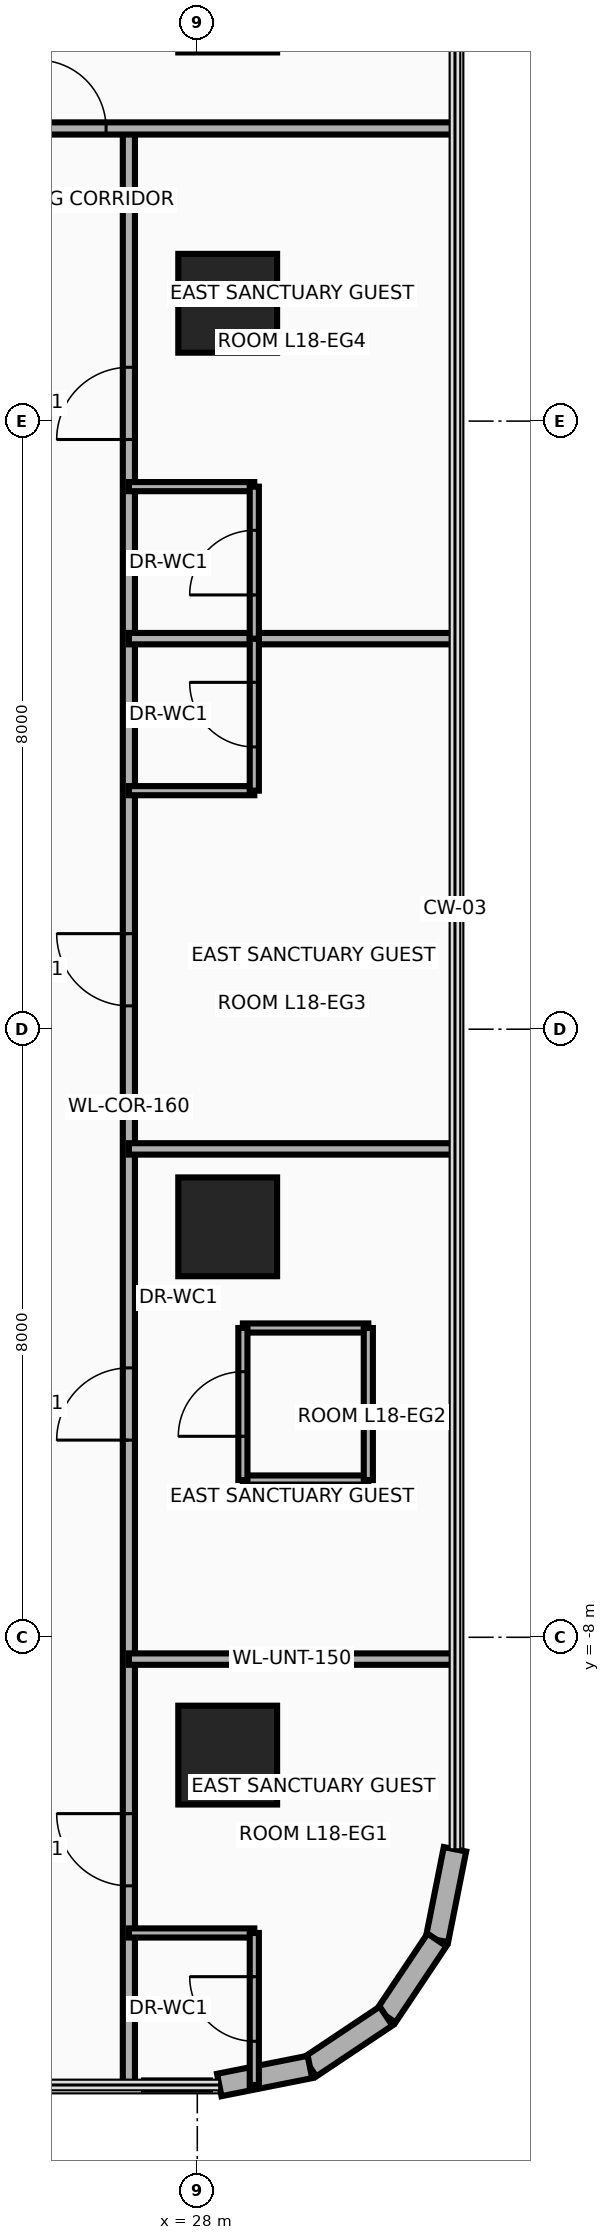
"""IFC4 building model, lengths in metres.
Left out: names, types, materials, properties, quantities, classifications, styles, units other than length and angle.
Written with IfcOpenShell. Run it as: python <this file> out.ifc"""

import sys

from ifc_helpers import new_model, si_unit, direction, frame, frame_2d, origin, origin_2d, place, context, subcontext, project, spatial, rectangle, circle, extrude, source, transform, mapped, element, fill, save


model = new_model("IFC4")
c1 = context("Model", 3, precision=1e-05, world=origin(), true_north=direction((0.0, 1.0)))
c2 = subcontext(c1, "Body", "Model", "MODEL_VIEW")
j1 = project(units=[si_unit("LENGTHUNIT", "METRE"), si_unit("PLANEANGLEUNIT", "RADIAN")], contexts=[c1])
p1 = place(None, origin())
s1 = spatial("IfcSite", under=j1, at=p1, CompositionType="ELEMENT")
p2 = place(p1, origin())
s2 = spatial("IfcBuilding", under=s1, at=p2, CompositionType="ELEMENT")
p3 = place(p2, frame((0.0, 0.0, 74.1)))
s3 = spatial("IfcBuildingStorey", under=s2, at=p3, CompositionType="ELEMENT", Elevation=74.1)
m1 = source(origin(), c2, "Body", "SweptSolid", [
    extrude(circle(Radius=0.65, at=origin_2d()), origin(), (0.0, 0.0, 1.0), 3.7),
])
for number, where, z_axis, x_axis in (
    (1, (28.4, -9.55, 0.0), (0.0, 0.0, 1.0), (1.0, 0.0, 0.0)),
    (2, (28.4, -2.6, 0.0), (0.0, 0.0, 1.0), (1.0, 0.0, 0.0)),
    (3, (28.4, 9.55, 0.0), (0.0, 0.0, 1.0), (1.0, 0.0, 0.0)),
):
    element("IfcColumn", number, at=place(p3, frame(where, z_axis=z_axis, x_axis=x_axis)), inside=s3, PredefinedType="COLUMN", context=c2, shape_type="MappedRepresentation", body=[
        mapped(m1, transform((0.0, 0.0, 0.0), x_axis=(1.0, 0.0, 0.0), y_axis=(0.0, 1.0, 0.0), z_axis=(0.0, 0.0, 1.0), scale=1.0)),
    ])
p4 = place(p3, frame((31.39, -10.789, 0.0), z_axis=(0.0, 0.0, 1.0), x_axis=(-0.194996050505, -0.980804027463, 0.0)))
e4 = element("IfcWall", 4, at=p4, inside=s3, PredefinedType="SOLIDWALL", context=c2, shape_type="SweptSolid", body=[
    extrude(rectangle(XDim=1.216, YDim=0.3, at=frame_2d((0.608, 0.0))), origin(), (0.0, 0.0, 1.0), 3.46),
])
for number, where, z_axis, x_axis in (
    (5, (31.153, -11.982, 0.0), (0.0, 0.0, 1.0), (-0.556, -0.831, 0.0)),
    (6, (30.483, -12.983, 0.0), (0.0, 0.0, 1.0), (-0.831, -0.556, 0.0)),
):
    element("IfcWall", number, at=place(p3, frame(where, z_axis=z_axis, x_axis=x_axis)), inside=s3, PredefinedType="SOLIDWALL", context=c2, shape_type="SweptSolid", body=[
        extrude(rectangle(XDim=1.205, YDim=0.3, at=frame_2d((0.603, 0.0))), origin(), (0.0, 0.0, 1.0), 3.46),
    ])
p5 = place(p3, frame((29.482, -13.653, 0.0), z_axis=(0.0, 0.0, 1.0), x_axis=(-0.980804027463, -0.194996050505, 0.0)))
e7 = element("IfcWall", 7, at=p5, inside=s3, PredefinedType="SOLIDWALL", context=c2, shape_type="SweptSolid", body=[
    extrude(rectangle(XDim=1.216, YDim=0.3, at=frame_2d((0.608, 0.0))), origin(), (0.0, 0.0, 1.0), 3.46),
])
p6 = place(p3, frame((27.1, -13.89, 0.0), z_axis=(0.0, 0.0, 1.0), x_axis=(0.0, 1.0, 0.0)))
e8 = element("IfcWall", 8, at=p6, inside=s3, PredefinedType="PARTITIONING", context=c2, shape_type="SweptSolid", body=[
    extrude(rectangle(XDim=25.74, YDim=0.16, at=frame_2d((12.87, 0.0))), origin(), (0.0, 0.0, 1.0), 2.583),
])
p7 = place(p6, frame((2.62, 0.0, 0.0)))
e9 = element("IfcOpeningElement", 9, at=p7, cuts=e8, PredefinedType="OPENING", context=c2, shape_type="SweptSolid", body=[
    extrude(rectangle(XDim=0.95, YDim=2.15, at=frame_2d((0.475, 1.075))), frame((0.0, 0.095, 0.0), z_axis=(0.0, -1.0, 0.0), x_axis=(1.0, 0.0, 0.0)), (0.0, 0.0, 1.0), 0.19),
])
p8 = place(p6, frame((8.484, 0.0, 0.0)))
e10 = element("IfcOpeningElement", 10, at=p8, cuts=e8, PredefinedType="OPENING", context=c2, shape_type="SweptSolid", body=[
    extrude(rectangle(XDim=0.95, YDim=2.15, at=frame_2d((0.475, 1.075))), frame((0.0, 0.095, 0.0), z_axis=(0.0, -1.0, 0.0), x_axis=(1.0, 0.0, 0.0)), (0.0, 0.0, 1.0), 0.19),
])
p9 = place(p6, frame((14.197, 0.0, 0.0)))
e11 = element("IfcOpeningElement", 11, at=p9, cuts=e8, PredefinedType="OPENING", context=c2, shape_type="SweptSolid", body=[
    extrude(rectangle(XDim=0.95, YDim=2.15, at=frame_2d((0.475, 1.075))), frame((0.0, 0.095, 0.0), z_axis=(0.0, -1.0, 0.0), x_axis=(1.0, 0.0, 0.0)), (0.0, 0.0, 1.0), 0.19),
])
p10 = place(p6, frame((21.648, 0.0, 0.0)))
e12 = element("IfcOpeningElement", 12, at=p10, cuts=e8, PredefinedType="OPENING", context=c2, shape_type="SweptSolid", body=[
    extrude(rectangle(XDim=0.95, YDim=2.15, at=frame_2d((0.475, 1.075))), frame((0.0, 0.095, 0.0), z_axis=(0.0, -1.0, 0.0), x_axis=(1.0, 0.0, 0.0)), (0.0, 0.0, 1.0), 0.19),
])
p11 = place(p3, frame((25.6, 11.85, 0.0), z_axis=(0.0, 0.0, 1.0), x_axis=(1.0, 0.0, 0.0)))
e13 = element("IfcWall", 13, at=p11, inside=s3, PredefinedType="PARTITIONING", context=c2, shape_type="SweptSolid", body=[
    extrude(rectangle(XDim=5.79, YDim=0.16, at=frame_2d((2.895, 0.0))), origin(), (0.0, 0.0, 1.0), 2.896),
])
p12 = place(p11, frame((0.3, 0.0, 0.0)))
e14 = element("IfcOpeningElement", 14, at=p12, cuts=e13, PredefinedType="OPENING", context=c2, shape_type="SweptSolid", body=[
    extrude(rectangle(XDim=0.9, YDim=2.1, at=frame_2d((0.45, 1.05))), frame((0.0, 0.095, 0.0), z_axis=(0.0, -1.0, 0.0), x_axis=(1.0, 0.0, 0.0)), (0.0, 0.0, 1.0), 0.19),
])
for number, where, z_axis, x_axis in (
    (15, (27.1, -8.287, 0.0), (0.0, 0.0, 1.0), (1.0, 0.0, 0.0)),
    (16, (27.1, -1.575, 0.0), (0.0, 0.0, 1.0), (1.0, 0.0, 0.0)),
    (17, (27.1, 5.138, 0.0), (0.0, 0.0, 1.0), (1.0, 0.0, 0.0)),
):
    element("IfcWall", number, at=place(p3, frame(where, z_axis=z_axis, x_axis=x_axis)), inside=s3, PredefinedType="PARTITIONING", context=c2, shape_type="SweptSolid", body=[
        extrude(rectangle(XDim=4.29, YDim=0.15, at=frame_2d((2.145, 0.0))), origin(), (0.0, 0.0, 1.0), 2.896),
    ])
p13 = place(p3, frame((27.1, -11.89, 0.0), z_axis=(0.0, 0.0, 1.0), x_axis=(1.0, 0.0, 0.0)))
e18 = element("IfcWall", 18, at=p13, inside=s3, PredefinedType="PARTITIONING", context=c2, shape_type="SweptSolid", body=[
    extrude(rectangle(XDim=1.65, YDim=0.12, at=frame_2d((0.825, 0.0))), origin(), (0.0, 0.0, 1.0), 3.46),
])
p14 = place(p3, frame((28.75, -13.89, 0.0), z_axis=(0.0, 0.0, 1.0), x_axis=(0.0, 1.0, 0.0)))
e19 = element("IfcWall", 19, at=p14, inside=s3, PredefinedType="PARTITIONING", context=c2, shape_type="SweptSolid", body=[
    extrude(rectangle(XDim=2.0, YDim=0.12, at=frame_2d((1.0, 0.0))), origin(), (0.0, 0.0, 1.0), 3.46),
])
p15 = place(p14, frame((0.575, 0.0, 0.0)))
e20 = element("IfcOpeningElement", 20, at=p15, cuts=e19, PredefinedType="OPENING", context=c2, shape_type="SweptSolid", body=[
    extrude(rectangle(XDim=0.85, YDim=2.1, at=frame_2d((0.425, 1.05))), frame((0.0, 0.075, 0.0), z_axis=(0.0, -1.0, 0.0), x_axis=(1.0, 0.0, 0.0)), (0.0, 0.0, 1.0), 0.15),
])
p16 = place(p3, frame((27.3, -13.89, 0.0), z_axis=(0.0, 0.0, 1.0), x_axis=(1.0, 0.0, 0.0)))
e21 = element("IfcWall", 21, at=p16, inside=s3, PredefinedType="PARTITIONING", context=c2, shape_type="SweptSolid", body=[
    extrude(rectangle(XDim=0.867, YDim=0.12, at=frame_2d((0.433, 0.0))), origin(), (0.0, 0.0, 1.0), 3.46),
])
for number, where, z_axis, x_axis in (
    (22, (28.6, -5.931, 0.0), (0.0, 0.0, 1.0), (1.0, 0.0, 0.0)),
    (23, (28.6, -3.931, 0.0), (0.0, 0.0, 1.0), (1.0, 0.0, 0.0)),
):
    element("IfcWall", number, at=place(p3, frame(where, z_axis=z_axis, x_axis=x_axis)), inside=s3, PredefinedType="PARTITIONING", context=c2, shape_type="SweptSolid", body=[
        extrude(rectangle(XDim=1.65, YDim=0.12, at=frame_2d((0.825, 0.0))), origin(), (0.0, 0.0, 1.0), 3.46),
    ])
p17 = place(p3, frame((30.25, -5.931, 0.0), z_axis=(0.0, 0.0, 1.0), x_axis=(0.0, 1.0, 0.0)))
e24 = element("IfcWall", 24, at=p17, inside=s3, PredefinedType="PARTITIONING", context=c2, shape_type="SweptSolid", body=[
    extrude(rectangle(XDim=2.0, YDim=0.12, at=frame_2d((1.0, 0.0))), origin(), (0.0, 0.0, 1.0), 3.46),
])
p18 = place(p3, frame((28.6, -5.931, 0.0), z_axis=(0.0, 0.0, 1.0), x_axis=(0.0, 1.0, 0.0)))
e25 = element("IfcWall", 25, at=p18, inside=s3, PredefinedType="PARTITIONING", context=c2, shape_type="SweptSolid", body=[
    extrude(rectangle(XDim=2.0, YDim=0.12, at=frame_2d((1.0, 0.0))), origin(), (0.0, 0.0, 1.0), 3.46),
])
p19 = place(p18, frame((0.575, 0.0, 0.0)))
e26 = element("IfcOpeningElement", 26, at=p19, cuts=e25, PredefinedType="OPENING", context=c2, shape_type="SweptSolid", body=[
    extrude(rectangle(XDim=0.85, YDim=2.1, at=frame_2d((0.425, 1.05))), frame((0.0, 0.075, 0.0), z_axis=(0.0, -1.0, 0.0), x_axis=(1.0, 0.0, 0.0)), (0.0, 0.0, 1.0), 0.15),
])
p20 = place(p3, frame((27.1, 3.138, 0.0), z_axis=(0.0, 0.0, 1.0), x_axis=(1.0, 0.0, 0.0)))
e27 = element("IfcWall", 27, at=p20, inside=s3, PredefinedType="PARTITIONING", context=c2, shape_type="SweptSolid", body=[
    extrude(rectangle(XDim=1.65, YDim=0.12, at=frame_2d((0.825, 0.0))), origin(), (0.0, 0.0, 1.0), 2.896),
])
p21 = place(p3, frame((28.75, 3.138, 0.0), z_axis=(0.0, 0.0, 1.0), x_axis=(0.0, 1.0, 0.0)))
e28 = element("IfcWall", 28, at=p21, inside=s3, PredefinedType="PARTITIONING", context=c2, shape_type="SweptSolid", body=[
    extrude(rectangle(XDim=2.0, YDim=0.12, at=frame_2d((1.0, 0.0))), origin(), (0.0, 0.0, 1.0), 3.46),
])
p22 = place(p21, frame((0.575, 0.0, 0.0)))
e29 = element("IfcOpeningElement", 29, at=p22, cuts=e28, PredefinedType="OPENING", context=c2, shape_type="SweptSolid", body=[
    extrude(rectangle(XDim=0.85, YDim=2.1, at=frame_2d((0.425, 1.05))), frame((0.0, 0.075, 0.0), z_axis=(0.0, -1.0, 0.0), x_axis=(1.0, 0.0, 0.0)), (0.0, 0.0, 1.0), 0.15),
])
p23 = place(p3, frame((27.1, 7.138, 0.0), z_axis=(0.0, 0.0, 1.0), x_axis=(1.0, 0.0, 0.0)))
e30 = element("IfcWall", 30, at=p23, inside=s3, PredefinedType="PARTITIONING", context=c2, shape_type="SweptSolid", body=[
    extrude(rectangle(XDim=1.65, YDim=0.12, at=frame_2d((0.825, 0.0))), origin(), (0.0, 0.0, 1.0), 2.896),
])
p24 = place(p3, frame((28.75, 5.138, 0.0), z_axis=(0.0, 0.0, 1.0), x_axis=(0.0, 1.0, 0.0)))
e31 = element("IfcWall", 31, at=p24, inside=s3, PredefinedType="PARTITIONING", context=c2, shape_type="SweptSolid", body=[
    extrude(rectangle(XDim=2.0, YDim=0.12, at=frame_2d((1.0, 0.0))), origin(), (0.0, 0.0, 1.0), 3.46),
])
p25 = place(p24, frame((0.575, 0.0, 0.0)))
e32 = element("IfcOpeningElement", 32, at=p25, cuts=e31, PredefinedType="OPENING", context=c2, shape_type="SweptSolid", body=[
    extrude(rectangle(XDim=0.85, YDim=2.1, at=frame_2d((0.425, 1.05))), frame((0.0, 0.075, 0.0), z_axis=(0.0, -1.0, 0.0), x_axis=(1.0, 0.0, 0.0)), (0.0, 0.0, 1.0), 0.15),
])
p26 = place(p12, origin())
e33 = element("IfcDoor", 33, at=p26, inside=s3, OperationType="SINGLE_SWING_LEFT", PredefinedType="DOOR", context=c2, shape_type="SweptSolid", body=[
    extrude(rectangle(XDim=0.9, YDim=2.1, at=frame_2d((0.45, 1.05))), frame((0.0, 0.025, 0.0), z_axis=(0.0, -1.0, 0.0), x_axis=(1.0, 0.0, 0.0)), (0.0, 0.0, 1.0), 0.05),
])
fill(e14, e33)
p27 = place(p7, origin())
e34 = element("IfcDoor", 34, at=p27, inside=s3, OperationType="SINGLE_SWING_RIGHT", PredefinedType="DOOR", context=c2, shape_type="SweptSolid", body=[
    extrude(rectangle(XDim=0.95, YDim=2.15, at=frame_2d((0.475, 1.075))), frame((0.0, 0.025, 0.0), z_axis=(0.0, -1.0, 0.0), x_axis=(1.0, 0.0, 0.0)), (0.0, 0.0, 1.0), 0.05),
])
fill(e9, e34)
p28 = place(p15, origin())
e35 = element("IfcDoor", 35, at=p28, inside=s3, OperationType="SINGLE_SWING_LEFT", PredefinedType="DOOR", context=c2, shape_type="SweptSolid", body=[
    extrude(rectangle(XDim=0.85, YDim=2.1, at=frame_2d((0.425, 1.05))), frame((0.0, 0.025, 0.0), z_axis=(0.0, -1.0, 0.0), x_axis=(1.0, 0.0, 0.0)), (0.0, 0.0, 1.0), 0.05),
])
fill(e20, e35)
p29 = place(p8, origin())
e36 = element("IfcDoor", 36, at=p29, inside=s3, OperationType="SINGLE_SWING_RIGHT", PredefinedType="DOOR", context=c2, shape_type="SweptSolid", body=[
    extrude(rectangle(XDim=0.95, YDim=2.15, at=frame_2d((0.475, 1.075))), frame((0.0, 0.025, 0.0), z_axis=(0.0, -1.0, 0.0), x_axis=(1.0, 0.0, 0.0)), (0.0, 0.0, 1.0), 0.05),
])
fill(e10, e36)
p30 = place(p19, origin())
e37 = element("IfcDoor", 37, at=p30, inside=s3, OperationType="SINGLE_SWING_LEFT", PredefinedType="DOOR", context=c2, shape_type="SweptSolid", body=[
    extrude(rectangle(XDim=0.85, YDim=2.1, at=frame_2d((0.425, 1.05))), frame((0.0, 0.025, 0.0), z_axis=(0.0, -1.0, 0.0), x_axis=(1.0, 0.0, 0.0)), (0.0, 0.0, 1.0), 0.05),
])
fill(e26, e37)
p31 = place(p9, origin())
e38 = element("IfcDoor", 38, at=p31, inside=s3, OperationType="SINGLE_SWING_RIGHT", PredefinedType="DOOR", context=c2, shape_type="SweptSolid", body=[
    extrude(rectangle(XDim=0.95, YDim=2.15, at=frame_2d((0.475, 1.075))), frame((0.0, 0.025, 0.0), z_axis=(0.0, -1.0, 0.0), x_axis=(1.0, 0.0, 0.0)), (0.0, 0.0, 1.0), 0.05),
])
fill(e11, e38)
p32 = place(p22, origin())
e39 = element("IfcDoor", 39, at=p32, inside=s3, OperationType="SINGLE_SWING_LEFT", PredefinedType="DOOR", context=c2, shape_type="SweptSolid", body=[
    extrude(rectangle(XDim=0.85, YDim=2.1, at=frame_2d((0.425, 1.05))), frame((0.0, 0.025, 0.0), z_axis=(0.0, -1.0, 0.0), x_axis=(1.0, 0.0, 0.0)), (0.0, 0.0, 1.0), 0.05),
])
fill(e29, e39)
p33 = place(p10, origin())
e40 = element("IfcDoor", 40, at=p33, inside=s3, OperationType="SINGLE_SWING_RIGHT", PredefinedType="DOOR", context=c2, shape_type="SweptSolid", body=[
    extrude(rectangle(XDim=0.95, YDim=2.15, at=frame_2d((0.475, 1.075))), frame((0.0, 0.025, 0.0), z_axis=(0.0, -1.0, 0.0), x_axis=(1.0, 0.0, 0.0)), (0.0, 0.0, 1.0), 0.05),
])
fill(e12, e40)
p34 = place(p25, origin())
e41 = element("IfcDoor", 41, at=p34, inside=s3, OperationType="SINGLE_SWING_LEFT", PredefinedType="DOOR", context=c2, shape_type="SweptSolid", body=[
    extrude(rectangle(XDim=0.85, YDim=2.1, at=frame_2d((0.425, 1.05))), frame((0.0, 0.025, 0.0), z_axis=(0.0, -1.0, 0.0), x_axis=(1.0, 0.0, 0.0)), (0.0, 0.0, 1.0), 0.05),
])
fill(e32, e41)
save(model, sys.argv[1])
